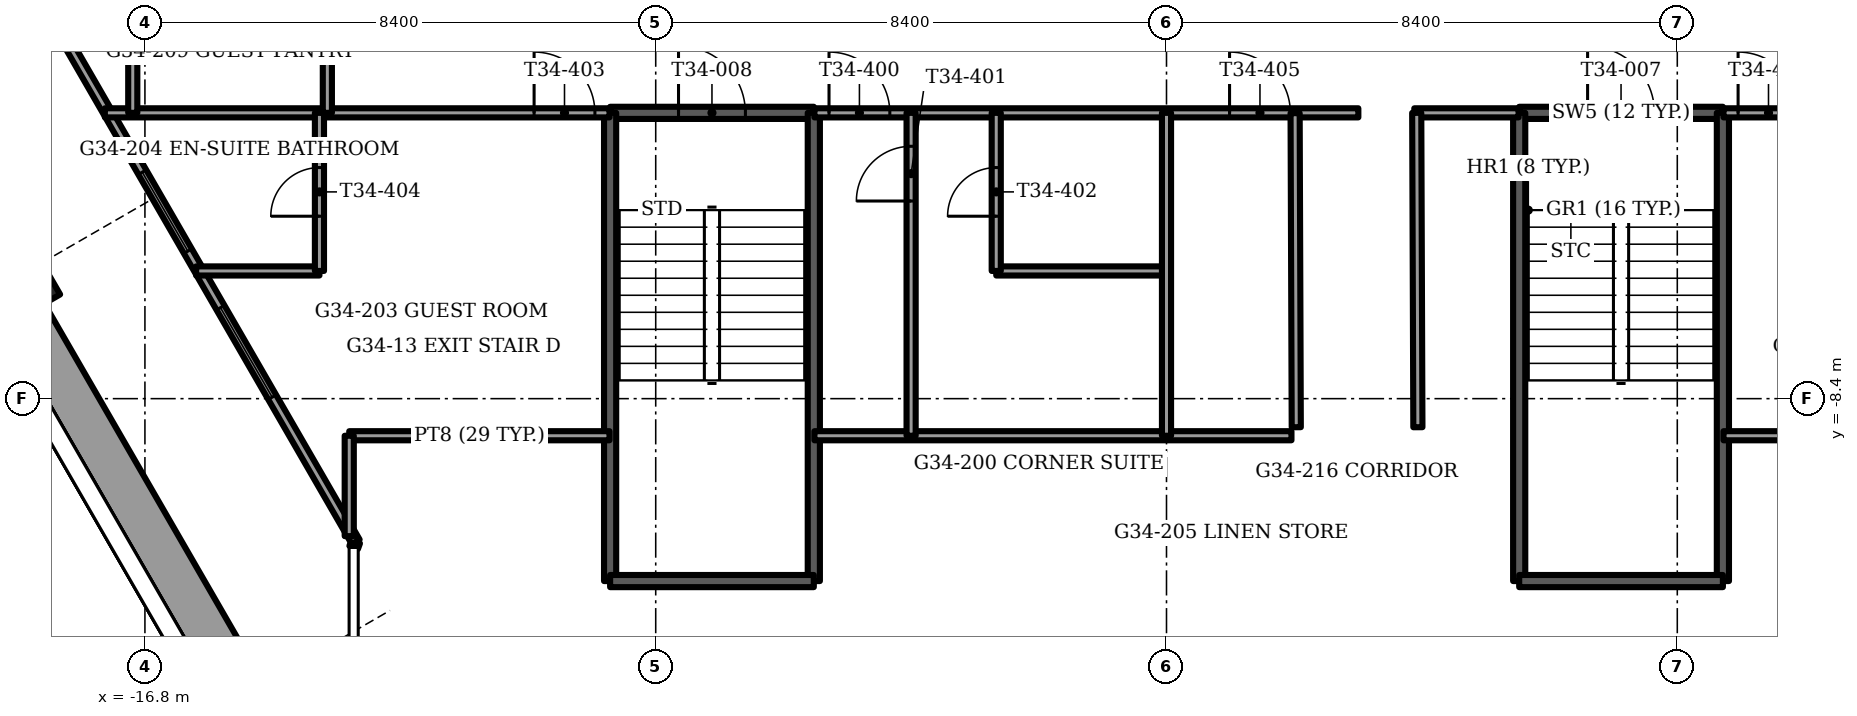
"""IFC4 building model, lengths in metres.
Left out: names, types, materials, properties, quantities, classifications, styles, units other than length and angle.
Written with IfcOpenShell. Run it as: python <this file> out.ifc"""

import sys

from ifc_helpers import new_model, si_unit, direction, frame, frame_2d, origin, origin_2d, place, context, subcontext, project, spatial, rectangle, extrude, element, fill, save


model = new_model("IFC4")
c1 = context("Model", 3, precision=1e-05, world=origin(), true_north=direction((0.0, 1.0)))
c2 = subcontext(c1, "Body", "Model", "MODEL_VIEW")
j1 = project(units=[si_unit("LENGTHUNIT", "METRE"), si_unit("PLANEANGLEUNIT", "RADIAN")], contexts=[c1])
p1 = place(None, origin())
s1 = spatial("IfcSite", under=j1, at=p1, CompositionType="ELEMENT")
p2 = place(p1, origin())
s2 = spatial("IfcBuilding", under=s1, at=p2, CompositionType="ELEMENT")
p3 = place(p2, frame((0.0, 0.0, 138.5)))
s3 = spatial("IfcBuildingStorey", under=s2, at=p3, CompositionType="ELEMENT", Elevation=138.5)
p4 = place(p3, frame((-19.014, -6.467, -1.2), z_axis=(0.0, 0.0, 1.0), x_axis=(-0.5, 0.866025403784, 0.0)))
e1 = element("IfcColumn", 1, at=p4, inside=s3, PredefinedType="COLUMN", context=c2, shape_type="SweptSolid", body=[
    extrude(rectangle(XDim=1.2, YDim=1.2, at=origin_2d()), origin(), (0.0, 0.0, 1.0), 3.75),
])
p5 = place(p3, frame((-18.859, -7.035, 0.0), z_axis=(0.0, 0.0, 1.0), x_axis=(0.499999023957, -0.866025967302, 0.0)))
e2 = element("IfcWall", 2, at=p5, inside=s3, PredefinedType="PARAPET", context=c2, shape_type="SweptSolid", body=[
    extrude(rectangle(XDim=6.673, YDim=0.9, at=frame_2d((3.337, 0.0))), origin(), (0.0, 0.0, 1.0), 1.1),
])
p6 = place(p3, frame((-18.568, -1.689, 0.0), z_axis=(0.0, 0.0, 1.0), x_axis=(0.499994317138, -0.866028684761, 0.0)))
e3 = element("IfcWall", 3, at=p6, inside=s3, PredefinedType="SOLIDWALL", context=c2, shape_type="SweptSolid", body=[
    extrude(rectangle(XDim=10.468, YDim=0.15, at=frame_2d((5.234, 0.0))), origin(), (0.0, 0.0, 1.0), 3.45),
])
p7 = place(p6, frame((3.448, 0.0, 0.15)))
e4 = element("IfcOpeningElement", 4, at=p7, cuts=e3, PredefinedType="OPENING", context=c2, shape_type="SweptSolid", body=[
    extrude(rectangle(XDim=1.5, YDim=2.2, at=frame_2d((0.75, 1.1))), frame((0.0, 0.075, 0.0), z_axis=(0.0, -1.0, 0.0), x_axis=(1.0, 0.0, 0.0)), (0.0, 0.0, 1.0), 0.15),
])
p8 = place(p6, frame((6.021, 0.0, 0.15)))
e5 = element("IfcOpeningElement", 5, at=p8, cuts=e3, PredefinedType="OPENING", context=c2, shape_type="SweptSolid", body=[
    extrude(rectangle(XDim=1.7, YDim=2.2, at=frame_2d((0.85, 1.1))), frame((0.0, 0.075, 0.0), z_axis=(0.0, -1.0, 0.0), x_axis=(1.0, 0.0, 0.0)), (0.0, 0.0, 1.0), 0.15),
])
p9 = place(p3, frame((-13.334, -10.755, 0.0), z_axis=(0.0, 0.0, 1.0), x_axis=(-0.337751931921, -0.941235163221, 0.0)))
e6 = element("IfcWall", 6, at=p9, inside=s3, PredefinedType="SOLIDWALL", context=c2, shape_type="SweptSolid", body=[
    extrude(rectangle(XDim=0.098, YDim=0.15, at=frame_2d((0.049, 0.0))), origin(), (0.0, 0.0, 1.0), 3.45),
])
p10 = place(p3, frame((5.8, -3.7, -0.3), z_axis=(0.0, 0.0, 1.0), x_axis=(1.0, 0.0, 0.0)))
e7 = element("IfcWall", 7, at=p10, inside=s3, PredefinedType="SOLIDWALL", context=c2, shape_type="SweptSolid", body=[
    extrude(rectangle(XDim=3.35, YDim=0.2, at=frame_2d((1.675, 0.0))), origin(), (0.0, 0.0, 1.0), 3.75),
])
p11 = place(p10, frame((1.125, 0.0, 0.0)))
e8 = element("IfcOpeningElement", 8, at=p11, cuts=e7, PredefinedType="OPENING", context=c2, shape_type="SweptSolid", body=[
    extrude(rectangle(XDim=1.1, YDim=2.1, at=frame_2d((0.55, 1.05))), frame((0.0, 0.1, 0.0), z_axis=(0.0, -1.0, 0.0), x_axis=(1.0, 0.0, 0.0)), (0.0, 0.0, 1.0), 0.2),
])
for number, where, z_axis, x_axis in (
    (9, (5.8, -3.7, -0.3), (0.0, 0.0, 1.0), (0.0, -1.0, 0.0)),
    (10, (9.15, -3.7, -0.3), (0.0, 0.0, 1.0), (0.0, -1.0, 0.0)),
):
    element("IfcWall", number, at=place(p3, frame(where, z_axis=z_axis, x_axis=x_axis)), inside=s3, PredefinedType="SOLIDWALL", context=c2, shape_type="SweptSolid", body=[
        extrude(rectangle(XDim=7.7, YDim=0.2, at=frame_2d((3.85, 0.0))), origin(), (0.0, 0.0, 1.0), 3.75),
    ])
p12 = place(p3, frame((5.8, -11.4, -0.3), z_axis=(0.0, 0.0, 1.0), x_axis=(1.0, 0.0, 0.0)))
e11 = element("IfcWall", 11, at=p12, inside=s3, PredefinedType="SOLIDWALL", context=c2, shape_type="SweptSolid", body=[
    extrude(rectangle(XDim=3.35, YDim=0.2, at=frame_2d((1.675, 0.0))), origin(), (0.0, 0.0, 1.0), 3.75),
])
p13 = place(p3, frame((-9.15, -3.7, -0.3), z_axis=(0.0, 0.0, 1.0), x_axis=(1.0, 0.0, 0.0)))
e12 = element("IfcWall", 12, at=p13, inside=s3, PredefinedType="SOLIDWALL", context=c2, shape_type="SweptSolid", body=[
    extrude(rectangle(XDim=3.35, YDim=0.2, at=frame_2d((1.675, 0.0))), origin(), (0.0, 0.0, 1.0), 3.75),
])
p14 = place(p13, frame((1.125, 0.0, 0.0)))
e13 = element("IfcOpeningElement", 13, at=p14, cuts=e12, PredefinedType="OPENING", context=c2, shape_type="SweptSolid", body=[
    extrude(rectangle(XDim=1.1, YDim=2.1, at=frame_2d((0.55, 1.05))), frame((0.0, 0.1, 0.0), z_axis=(0.0, -1.0, 0.0), x_axis=(1.0, 0.0, 0.0)), (0.0, 0.0, 1.0), 0.2),
])
for number, where, z_axis, x_axis in (
    (14, (-9.15, -3.7, -0.3), (0.0, 0.0, 1.0), (0.0, -1.0, 0.0)),
    (15, (-5.8, -3.7, -0.3), (0.0, 0.0, 1.0), (0.0, -1.0, 0.0)),
):
    element("IfcWall", number, at=place(p3, frame(where, z_axis=z_axis, x_axis=x_axis)), inside=s3, PredefinedType="SOLIDWALL", context=c2, shape_type="SweptSolid", body=[
        extrude(rectangle(XDim=7.7, YDim=0.2, at=frame_2d((3.85, 0.0))), origin(), (0.0, 0.0, 1.0), 3.75),
    ])
p15 = place(p3, frame((-9.15, -11.4, -0.3), z_axis=(0.0, 0.0, 1.0), x_axis=(1.0, 0.0, 0.0)))
e16 = element("IfcWall", 16, at=p15, inside=s3, PredefinedType="SOLIDWALL", context=c2, shape_type="SweptSolid", body=[
    extrude(rectangle(XDim=3.35, YDim=0.2, at=frame_2d((1.675, 0.0))), origin(), (0.0, 0.0, 1.0), 3.75),
])
p16 = place(p3, frame((-13.44, -9.01, 0.0), z_axis=(0.0, 0.0, 1.0), x_axis=(1.0, 0.0, 0.0)))
e17 = element("IfcWall", 17, at=p16, inside=s3, PredefinedType="PARTITIONING", context=c2, shape_type="SweptSolid", body=[
    extrude(rectangle(XDim=4.28, YDim=0.15, at=frame_2d((2.14, 0.0))), origin(), (0.0, 0.0, 1.0), 3.45),
])
p17 = place(p3, frame((-5.79, -9.01, 0.0), z_axis=(0.0, 0.0, 1.0), x_axis=(1.0, 0.0, 0.0)))
e18 = element("IfcWall", 18, at=p17, inside=s3, PredefinedType="PARTITIONING", context=c2, shape_type="SweptSolid", body=[
    extrude(rectangle(XDim=7.845, YDim=0.15, at=frame_2d((3.922, 0.0))), origin(), (0.0, 0.0, 1.0), 3.45),
])
p18 = place(p3, frame((9.16, -9.01, 0.0), z_axis=(0.0, 0.0, 1.0), x_axis=(1.0, 0.0, 0.0)))
e19 = element("IfcWall", 19, at=p18, inside=s3, PredefinedType="PARTITIONING", context=c2, shape_type="SweptSolid", body=[
    extrude(rectangle(XDim=4.28, YDim=0.15, at=frame_2d((2.14, 0.0))), origin(), (0.0, 0.0, 1.0), 3.45),
])
p19 = place(p3, frame((-15.958, -6.3, 0.0), z_axis=(0.0, 0.0, 1.0), x_axis=(1.0, 0.0, 0.0)))
e20 = element("IfcWall", 20, at=p19, inside=s3, PredefinedType="PARTITIONING", context=c2, shape_type="SweptSolid", body=[
    extrude(rectangle(XDim=2.028, YDim=0.15, at=frame_2d((1.014, 0.0))), origin(), (0.0, 0.0, 1.0), 3.45),
])
p20 = place(p3, frame((-2.8, -6.3, 0.0), z_axis=(0.0, 0.0, 1.0), x_axis=(1.0, 0.0, 0.0)))
e21 = element("IfcWall", 21, at=p20, inside=s3, PredefinedType="PARTITIONING", context=c2, shape_type="SweptSolid", body=[
    extrude(rectangle(XDim=2.8, YDim=0.15, at=frame_2d((1.4, 0.0))), origin(), (0.0, 0.0, 1.0), 3.45),
])
p21 = place(p3, frame((-17.459, -3.7, 0.0), z_axis=(0.0, 0.0, 1.0), x_axis=(1.0, 0.0, 0.0)))
e22 = element("IfcWall", 22, at=p21, inside=s3, PredefinedType="PARTITIONING", context=c2, shape_type="SweptSolid", body=[
    extrude(rectangle(XDim=8.299, YDim=0.15, at=frame_2d((4.149, 0.0))), origin(), (0.0, 0.0, 1.0), 3.45),
])
p22 = place(p21, frame((7.059, 0.0, 0.0)))
e23 = element("IfcOpeningElement", 23, at=p22, cuts=e22, PredefinedType="OPENING", context=c2, shape_type="SweptSolid", body=[
    extrude(rectangle(XDim=1.0, YDim=2.1, at=frame_2d((0.5, 1.05))), frame((0.0, 0.075, 0.0), z_axis=(0.0, -1.0, 0.0), x_axis=(1.0, 0.0, 0.0)), (0.0, 0.0, 1.0), 0.15),
])
p23 = place(p3, frame((-5.79, -3.7, 0.0), z_axis=(0.0, 0.0, 1.0), x_axis=(1.0, 0.0, 0.0)))
e24 = element("IfcWall", 24, at=p23, inside=s3, PredefinedType="PARTITIONING", context=c2, shape_type="SweptSolid", body=[
    extrude(rectangle(XDim=8.945, YDim=0.15, at=frame_2d((4.473, 0.0))), origin(), (0.0, 0.0, 1.0), 3.45),
])
p24 = place(p23, frame((0.24, 0.0, 0.0)))
e25 = element("IfcOpeningElement", 25, at=p24, cuts=e24, PredefinedType="OPENING", context=c2, shape_type="SweptSolid", body=[
    extrude(rectangle(XDim=1.0, YDim=2.1, at=frame_2d((0.5, 1.05))), frame((0.0, 0.075, 0.0), z_axis=(0.0, -1.0, 0.0), x_axis=(1.0, 0.0, 0.0)), (0.0, 0.0, 1.0), 0.15),
])
p25 = place(p23, frame((6.827, 0.0, 0.0)))
e26 = element("IfcOpeningElement", 26, at=p25, cuts=e24, PredefinedType="OPENING", context=c2, shape_type="SweptSolid", body=[
    extrude(rectangle(XDim=1.0, YDim=2.1, at=frame_2d((0.5, 1.05))), frame((0.0, 0.075, 0.0), z_axis=(0.0, -1.0, 0.0), x_axis=(1.0, 0.0, 0.0)), (0.0, 0.0, 1.0), 0.15),
])
p26 = place(p3, frame((4.075, -3.7, 0.0), z_axis=(0.0, 0.0, 1.0), x_axis=(1.0, 0.0, 0.0)))
e27 = element("IfcWall", 27, at=p26, inside=s3, PredefinedType="PARTITIONING", context=c2, shape_type="SweptSolid", body=[
    extrude(rectangle(XDim=1.715, YDim=0.15, at=frame_2d((0.857, 0.0))), origin(), (0.0, 0.0, 1.0), 3.45),
])
p27 = place(p3, frame((9.16, -3.7, 0.0), z_axis=(0.0, 0.0, 1.0), x_axis=(1.0, 0.0, 0.0)))
e28 = element("IfcWall", 28, at=p27, inside=s3, PredefinedType="PARTITIONING", context=c2, shape_type="SweptSolid", body=[
    extrude(rectangle(XDim=8.299, YDim=0.15, at=frame_2d((4.149, 0.0))), origin(), (0.0, 0.0, 1.0), 3.45),
])
p28 = place(p27, frame((0.24, 0.0, 0.0)))
e29 = element("IfcOpeningElement", 29, at=p28, cuts=e28, PredefinedType="OPENING", context=c2, shape_type="SweptSolid", body=[
    extrude(rectangle(XDim=1.0, YDim=2.1, at=frame_2d((0.5, 1.05))), frame((0.0, 0.075, 0.0), z_axis=(0.0, -1.0, 0.0), x_axis=(1.0, 0.0, 0.0)), (0.0, 0.0, 1.0), 0.15),
])
p29 = place(p3, frame((0.0, -9.01, 0.0), z_axis=(0.0, 0.0, 1.0), x_axis=(0.0, 1.0, 0.0)))
e30 = element("IfcWall", 30, at=p29, inside=s3, PredefinedType="PARTITIONING", context=c2, shape_type="SweptSolid", body=[
    extrude(rectangle(XDim=5.31, YDim=0.15, at=frame_2d((2.655, 0.0))), origin(), (0.0, 0.0, 1.0), 3.45),
])
p30 = place(p3, frame((-2.8, -6.3, 0.0), z_axis=(0.0, 0.0, 1.0), x_axis=(0.0, 1.0, 0.0)))
e31 = element("IfcWall", 31, at=p30, inside=s3, PredefinedType="PARTITIONING", context=c2, shape_type="SweptSolid", body=[
    extrude(rectangle(XDim=2.6, YDim=0.15, at=frame_2d((1.3, 0.0))), origin(), (0.0, 0.0, 1.0), 3.45),
])
p31 = place(p30, frame((0.9, 0.0, 0.0)))
e32 = element("IfcOpeningElement", 32, at=p31, cuts=e31, PredefinedType="OPENING", context=c2, shape_type="SweptSolid", body=[
    extrude(rectangle(XDim=0.8, YDim=2.1, at=frame_2d((0.4, 1.05))), frame((0.0, 0.075, 0.0), z_axis=(0.0, -1.0, 0.0), x_axis=(1.0, 0.0, 0.0)), (0.0, 0.0, 1.0), 0.15),
])
p32 = place(p3, frame((-4.2, -9.01, 0.0), z_axis=(0.0, 0.0, 1.0), x_axis=(0.0, 1.0, 0.0)))
e33 = element("IfcWall", 33, at=p32, inside=s3, PredefinedType="PARTITIONING", context=c2, shape_type="SweptSolid", body=[
    extrude(rectangle(XDim=5.31, YDim=0.15, at=frame_2d((2.655, 0.0))), origin(), (0.0, 0.0, 1.0), 3.45),
])
p33 = place(p32, frame((3.86, 0.0, 0.0)))
e34 = element("IfcOpeningElement", 34, at=p33, cuts=e33, PredefinedType="OPENING", context=c2, shape_type="SweptSolid", body=[
    extrude(rectangle(XDim=0.9, YDim=2.1, at=frame_2d((0.45, 1.05))), frame((0.0, 0.075, 0.0), z_axis=(0.0, -1.0, 0.0), x_axis=(1.0, 0.0, 0.0)), (0.0, 0.0, 1.0), 0.15),
])
p34 = place(p3, frame((-13.44, -10.661, 0.0), z_axis=(0.0, 0.0, 1.0), x_axis=(0.0, 1.0, 0.0)))
e35 = element("IfcWall", 35, at=p34, inside=s3, PredefinedType="PARTITIONING", context=c2, shape_type="SweptSolid", body=[
    extrude(rectangle(XDim=1.651, YDim=0.15, at=frame_2d((0.825, 0.0))), origin(), (0.0, 0.0, 1.0), 3.45),
])
p35 = place(p3, frame((-13.8, -3.7, 0.0), z_axis=(0.0, 0.0, 1.0), x_axis=(0.0, 1.0, 0.0)))
e36 = element("IfcWall", 36, at=p35, inside=s3, PredefinedType="PARTITIONING", context=c2, shape_type="SweptSolid", body=[
    extrude(rectangle(XDim=11.425, YDim=0.15, at=frame_2d((5.712, 0.0))), origin(), (0.0, 0.0, 1.0), 3.45),
])
p36 = place(p35, frame((3.595, 0.0, 0.0)))
e37 = element("IfcOpeningElement", 37, at=p36, cuts=e36, PredefinedType="OPENING", context=c2, shape_type="SweptSolid", body=[
    extrude(rectangle(XDim=1.0, YDim=2.1, at=frame_2d((0.5, 1.05))), frame((0.0, 0.075, 0.0), z_axis=(0.0, -1.0, 0.0), x_axis=(1.0, 0.0, 0.0)), (0.0, 0.0, 1.0), 0.15),
])
p37 = place(p35, frame((8.24, 0.0, 0.0)))
e38 = element("IfcOpeningElement", 38, at=p37, cuts=e36, PredefinedType="OPENING", context=c2, shape_type="SweptSolid", body=[
    extrude(rectangle(XDim=1.0, YDim=2.1, at=frame_2d((0.5, 1.05))), frame((0.0, 0.075, 0.0), z_axis=(0.0, -1.0, 0.0), x_axis=(1.0, 0.0, 0.0)), (0.0, 0.0, 1.0), 0.15),
])
p38 = place(p3, frame((-13.93, -6.3, 0.0), z_axis=(0.0, 0.0, 1.0), x_axis=(0.0, 1.0, 0.0)))
e39 = element("IfcWall", 39, at=p38, inside=s3, PredefinedType="PARTITIONING", context=c2, shape_type="SweptSolid", body=[
    extrude(rectangle(XDim=2.6, YDim=0.15, at=frame_2d((1.3, 0.0))), origin(), (0.0, 0.0, 1.0), 3.45),
])
p39 = place(p38, frame((0.9, 0.0, 0.0)))
e40 = element("IfcOpeningElement", 40, at=p39, cuts=e39, PredefinedType="OPENING", context=c2, shape_type="SweptSolid", body=[
    extrude(rectangle(XDim=0.8, YDim=2.1, at=frame_2d((0.4, 1.05))), frame((0.0, 0.075, 0.0), z_axis=(0.0, -1.0, 0.0), x_axis=(1.0, 0.0, 0.0)), (0.0, 0.0, 1.0), 0.15),
])
p40 = place(p3, frame((-17.0, -3.7, 0.0), z_axis=(0.0, 0.0, 1.0), x_axis=(0.0, 1.0, 0.0)))
e41 = element("IfcWall", 41, at=p40, inside=s3, PredefinedType="PARTITIONING", context=c2, shape_type="SweptSolid", body=[
    extrude(rectangle(XDim=2.6, YDim=0.15, at=frame_2d((1.3, 0.0))), origin(), (0.0, 0.0, 1.0), 3.45),
])
p41 = place(p3, frame((4.134, -8.87, 0.0), z_axis=(0.0, 0.0, 1.0), x_axis=(-0.003683216269, 0.999993216936, 0.0)))
e42 = element("IfcWall", 42, at=p41, inside=s3, PredefinedType="PARTITIONING", context=c2, shape_type="SweptSolid", body=[
    extrude(rectangle(XDim=5.17, YDim=0.15, at=frame_2d((2.585, 0.0))), origin(), (0.0, 0.0, 1.0), 3.45),
])
p42 = place(p3, frame((2.134, -8.87, 0.0), z_axis=(0.0, 0.0, 1.0), x_axis=(-0.003686872276, 0.999993203463, 0.0)))
e43 = element("IfcWall", 43, at=p42, inside=s3, PredefinedType="PARTITIONING", context=c2, shape_type="SweptSolid", body=[
    extrude(rectangle(XDim=5.165, YDim=0.15, at=frame_2d((2.583, 0.0))), origin(), (0.0, 0.0, 1.0), 3.45),
])
p43 = place(p7, origin())
e44 = element("IfcWindow", 44, at=p43, inside=s3, PartitioningType="SINGLE_PANEL", PredefinedType="WINDOW", context=c2, shape_type="SweptSolid", body=[
    extrude(rectangle(XDim=1.5, YDim=2.2, at=frame_2d((0.75, 1.1))), frame((0.0, 0.03, 0.0), z_axis=(0.0, -1.0, 0.0), x_axis=(1.0, 0.0, 0.0)), (0.0, 0.0, 1.0), 0.06),
])
fill(e4, e44)
p44 = place(p8, origin())
e45 = element("IfcWindow", 45, at=p44, inside=s3, PartitioningType="SINGLE_PANEL", PredefinedType="WINDOW", context=c2, shape_type="SweptSolid", body=[
    extrude(rectangle(XDim=1.7, YDim=2.2, at=frame_2d((0.85, 1.1))), frame((0.0, 0.03, 0.0), z_axis=(0.0, -1.0, 0.0), x_axis=(1.0, 0.0, 0.0)), (0.0, 0.0, 1.0), 0.06),
])
fill(e5, e45)
p45 = place(p11, origin())
e46 = element("IfcDoor", 46, at=p45, inside=s3, OperationType="SINGLE_SWING_LEFT", PredefinedType="DOOR", context=c2, shape_type="SweptSolid", body=[
    extrude(rectangle(XDim=1.1, YDim=2.1, at=frame_2d((0.55, 1.05))), frame((0.0, 0.025, 0.0), z_axis=(0.0, -1.0, 0.0), x_axis=(1.0, 0.0, 0.0)), (0.0, 0.0, 1.0), 0.05),
])
fill(e8, e46)
p46 = place(p14, origin())
e47 = element("IfcDoor", 47, at=p46, inside=s3, OperationType="SINGLE_SWING_LEFT", PredefinedType="DOOR", context=c2, shape_type="SweptSolid", body=[
    extrude(rectangle(XDim=1.1, YDim=2.1, at=frame_2d((0.55, 1.05))), frame((0.0, 0.025, 0.0), z_axis=(0.0, -1.0, 0.0), x_axis=(1.0, 0.0, 0.0)), (0.0, 0.0, 1.0), 0.05),
])
fill(e13, e47)
p47 = place(p24, origin())
e48 = element("IfcDoor", 48, at=p47, inside=s3, OperationType="SINGLE_SWING_LEFT", PredefinedType="DOOR", context=c2, shape_type="SweptSolid", body=[
    extrude(rectangle(XDim=1.0, YDim=2.1, at=frame_2d((0.5, 1.05))), frame((0.0, 0.025, 0.0), z_axis=(0.0, -1.0, 0.0), x_axis=(1.0, 0.0, 0.0)), (0.0, 0.0, 1.0), 0.05),
])
fill(e25, e48)
p48 = place(p33, origin())
e49 = element("IfcDoor", 49, at=p48, inside=s3, OperationType="SINGLE_SWING_RIGHT", PredefinedType="DOOR", context=c2, shape_type="SweptSolid", body=[
    extrude(rectangle(XDim=0.9, YDim=2.1, at=frame_2d((0.45, 1.05))), frame((0.0, 0.025, 0.0), z_axis=(0.0, -1.0, 0.0), x_axis=(1.0, 0.0, 0.0)), (0.0, 0.0, 1.0), 0.05),
])
fill(e34, e49)
p49 = place(p31, origin())
e50 = element("IfcDoor", 50, at=p49, inside=s3, OperationType="SINGLE_SWING_RIGHT", PredefinedType="DOOR", context=c2, shape_type="SweptSolid", body=[
    extrude(rectangle(XDim=0.8, YDim=2.1, at=frame_2d((0.4, 1.05))), frame((0.0, 0.025, 0.0), z_axis=(0.0, -1.0, 0.0), x_axis=(1.0, 0.0, 0.0)), (0.0, 0.0, 1.0), 0.05),
])
fill(e32, e50)
p50 = place(p22, origin())
e51 = element("IfcDoor", 51, at=p50, inside=s3, OperationType="SINGLE_SWING_RIGHT", PredefinedType="DOOR", context=c2, shape_type="SweptSolid", body=[
    extrude(rectangle(XDim=1.0, YDim=2.1, at=frame_2d((0.5, 1.05))), frame((0.0, 0.025, 0.0), z_axis=(0.0, -1.0, 0.0), x_axis=(1.0, 0.0, 0.0)), (0.0, 0.0, 1.0), 0.05),
])
fill(e23, e51)
p51 = place(p39, origin())
e52 = element("IfcDoor", 52, at=p51, inside=s3, OperationType="SINGLE_SWING_RIGHT", PredefinedType="DOOR", context=c2, shape_type="SweptSolid", body=[
    extrude(rectangle(XDim=0.8, YDim=2.1, at=frame_2d((0.4, 1.05))), frame((0.0, 0.025, 0.0), z_axis=(0.0, -1.0, 0.0), x_axis=(1.0, 0.0, 0.0)), (0.0, 0.0, 1.0), 0.05),
])
fill(e40, e52)
p52 = place(p25, origin())
e53 = element("IfcDoor", 53, at=p52, inside=s3, OperationType="SINGLE_SWING_LEFT", PredefinedType="DOOR", context=c2, shape_type="SweptSolid", body=[
    extrude(rectangle(XDim=1.0, YDim=2.1, at=frame_2d((0.5, 1.05))), frame((0.0, 0.025, 0.0), z_axis=(0.0, -1.0, 0.0), x_axis=(1.0, 0.0, 0.0)), (0.0, 0.0, 1.0), 0.05),
])
fill(e26, e53)
p53 = place(p28, origin())
e54 = element("IfcDoor", 54, at=p53, inside=s3, OperationType="SINGLE_SWING_LEFT", PredefinedType="DOOR", context=c2, shape_type="SweptSolid", body=[
    extrude(rectangle(XDim=1.0, YDim=2.1, at=frame_2d((0.5, 1.05))), frame((0.0, 0.025, 0.0), z_axis=(0.0, -1.0, 0.0), x_axis=(1.0, 0.0, 0.0)), (0.0, 0.0, 1.0), 0.05),
])
fill(e29, e54)
save(model, sys.argv[1])
